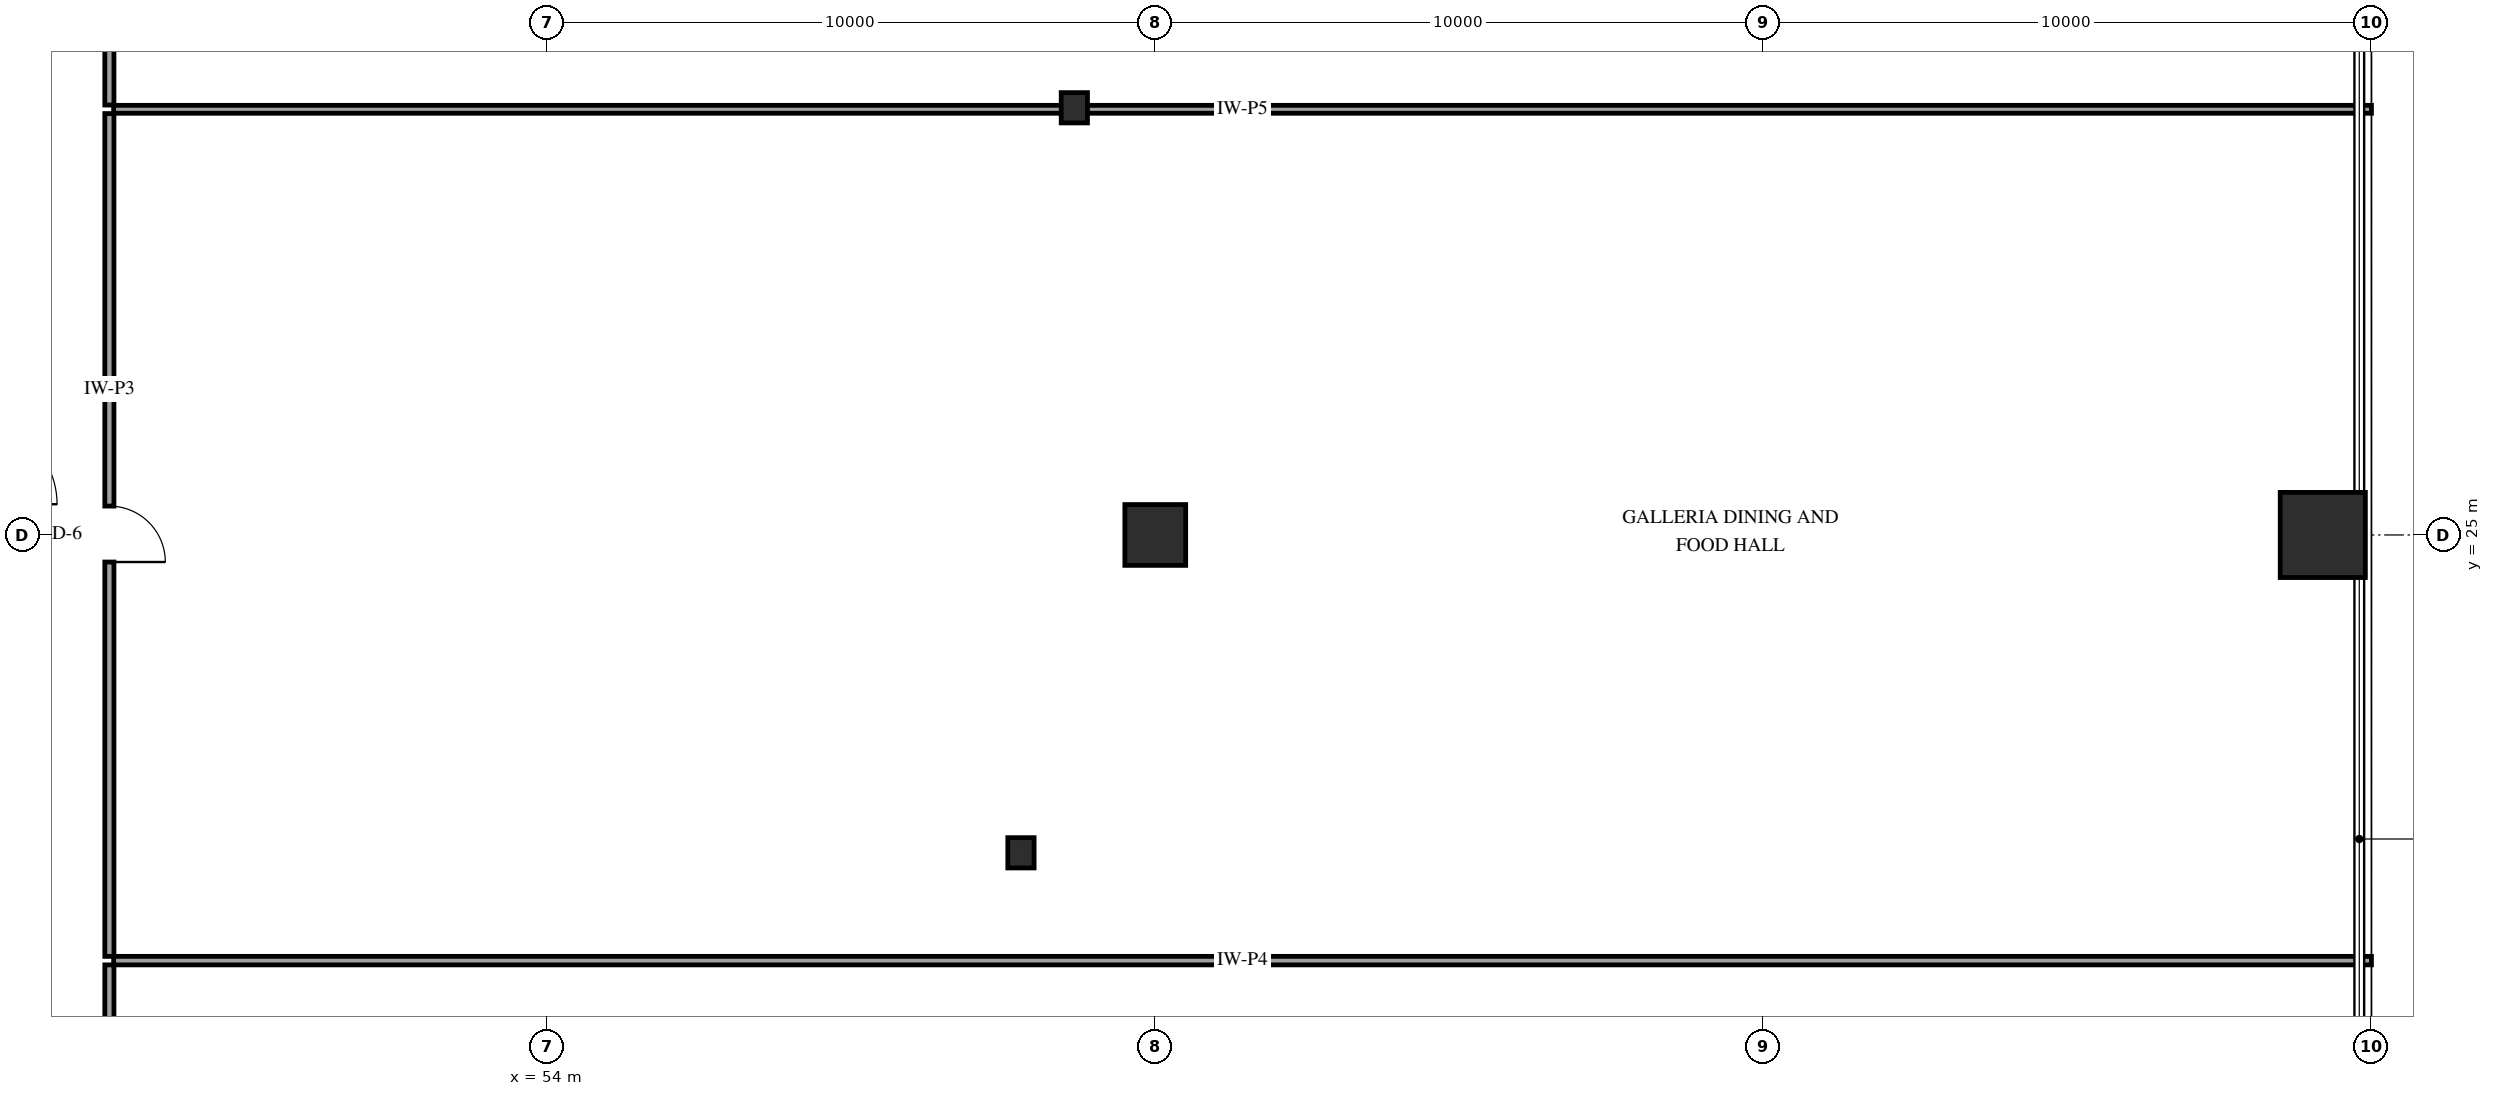
"""IFC4 building model, lengths in metres.
Left out: names, types, materials, properties, quantities, classifications, styles, units other than length and angle.
Written with IfcOpenShell. Run it as: python <this file> out.ifc"""

import sys

from ifc_helpers import new_model, si_unit, direction, frame, frame_2d, origin, origin_2d, place, context, subcontext, project, spatial, rectangle, i_section, extrude, element, fill, save


model = new_model("IFC4")
c1 = context("Model", 3, precision=1e-05, world=origin(), true_north=direction((0.0, 1.0)))
c2 = subcontext(c1, "Body", "Model", "MODEL_VIEW")
j1 = project(units=[si_unit("LENGTHUNIT", "METRE"), si_unit("PLANEANGLEUNIT", "RADIAN")], contexts=[c1])
p1 = place(None, origin())
s1 = spatial("IfcSite", under=j1, at=p1, CompositionType="ELEMENT")
p2 = place(p1, origin())
s2 = spatial("IfcBuilding", under=s1, at=p2, CompositionType="ELEMENT")
p3 = place(p2, frame((0.0, 0.0, 11.4)))
s3 = spatial("IfcBuildingStorey", under=s2, at=p3, CompositionType="ELEMENT", Elevation=11.4)
p4 = place(p3, frame((64.0, 25.0, 0.0), z_axis=(0.0, 0.0, 1.0), x_axis=(1.0, 0.0, 0.0)))
e1 = element("IfcColumn", 1, at=p4, inside=s3, PredefinedType="COLUMN", context=c2, shape_type="SweptSolid", body=[
    extrude(rectangle(XDim=1.0, YDim=1.0, at=origin_2d()), origin(), (0.0, 0.0, 1.0), 4.8),
])
p5 = place(p3, frame((83.2, 25.0, 0.0), z_axis=(0.0, 0.0, 1.0), x_axis=(1.0, 0.0, 0.0)))
e2 = element("IfcColumn", 2, at=p5, inside=s3, PredefinedType="COLUMN", context=c2, shape_type="SweptSolid", body=[
    extrude(rectangle(XDim=1.4, YDim=1.4, at=origin_2d()), origin(), (0.0, 0.0, 1.0), 4.8),
])
for number, where, z_axis, x_axis in (
    (3, (62.669, 32.025, 0.0), (0.0, 0.0, 1.0), (1.0, 0.0, 0.0)),
    (4, (61.791, 19.773, 0.0), (0.0, 0.0, 1.0), (1.0, 0.0, 0.0)),
):
    element("IfcColumn", number, at=place(p3, frame(where, z_axis=z_axis, x_axis=x_axis)), inside=s3, PredefinedType="COLUMN", context=c2, shape_type="SweptSolid", body=[
        extrude(i_section(OverallWidth=0.432, OverallDepth=0.498, WebThickness=0.056, FlangeThickness=0.089, FilletRadius=0.038, at=origin_2d()), origin(), (0.0, 0.0, 1.0), 4.8),
    ])
p6 = place(p3, frame((46.87, 18.0, 0.0), z_axis=(0.0, 0.0, 1.0), x_axis=(1.0, 0.0, 0.0)))
e5 = element("IfcWall", 5, at=p6, inside=s3, PredefinedType="PARTITIONING", context=c2, shape_type="SweptSolid", body=[
    extrude(rectangle(XDim=37.13, YDim=0.14, at=frame_2d((18.565, 0.0))), origin(), (0.0, 0.0, 1.0), 4.48),
])
p7 = place(p3, frame((46.87, 32.0, 0.0), z_axis=(0.0, 0.0, 1.0), x_axis=(1.0, 0.0, 0.0)))
e6 = element("IfcWall", 6, at=p7, inside=s3, PredefinedType="PARTITIONING", context=c2, shape_type="SweptSolid", body=[
    extrude(rectangle(XDim=37.13, YDim=0.13, at=frame_2d((18.565, 0.0))), origin(), (0.0, 0.0, 1.0), 4.48),
])
p8 = place(p3, frame((46.8, 31.93, 0.0), z_axis=(0.0, 0.0, 1.0), x_axis=(0.0, -1.0, 0.0)))
e7 = element("IfcWall", 7, at=p8, inside=s3, PredefinedType="PARTITIONING", context=c2, shape_type="SweptSolid", body=[
    extrude(rectangle(XDim=13.86, YDim=0.15, at=frame_2d((6.93, 0.0))), origin(), (0.0, 0.0, 1.0), 4.48),
])
p9 = place(p8, frame((6.455, 0.0, 0.0)))
e8 = element("IfcOpeningElement", 8, at=p9, cuts=e7, PredefinedType="OPENING", context=c2, shape_type="SweptSolid", body=[
    extrude(rectangle(XDim=0.92, YDim=2.12, at=frame_2d((0.46, 1.06))), frame((0.0, 0.085, 0.0), z_axis=(0.0, -1.0, 0.0), x_axis=(1.0, 0.0, 0.0)), (0.0, 0.0, 1.0), 0.17),
])
p10 = place(p3, frame((46.8, 42.93, 0.0), z_axis=(0.0, 0.0, 1.0), x_axis=(0.0, -1.0, 0.0)))
e9 = element("IfcWall", 9, at=p10, inside=s3, PredefinedType="PARTITIONING", context=c2, shape_type="SweptSolid", body=[
    extrude(rectangle(XDim=10.86, YDim=0.15, at=frame_2d((5.43, 0.0))), origin(), (0.0, 0.0, 1.0), 4.48),
])
p11 = place(p3, frame((46.8, 17.93, 0.0), z_axis=(0.0, 0.0, 1.0), x_axis=(0.0, -1.0, 0.0)))
e10 = element("IfcWall", 10, at=p11, inside=s3, PredefinedType="PARTITIONING", context=c2, shape_type="SweptSolid", body=[
    extrude(rectangle(XDim=6.06, YDim=0.15, at=frame_2d((3.03, 0.0))), origin(), (0.0, 0.0, 1.0), 4.48),
])
p12 = place(p9, origin())
e11 = element("IfcDoor", 11, at=p12, inside=s3, OperationType="SINGLE_SWING_RIGHT", PredefinedType="DOOR", context=c2, shape_type="SweptSolid", body=[
    extrude(rectangle(XDim=0.92, YDim=2.12, at=frame_2d((0.46, 1.06))), frame((0.0, 0.025, 0.0), z_axis=(0.0, -1.0, 0.0), x_axis=(1.0, 0.0, 0.0)), (0.0, 0.0, 1.0), 0.05),
])
fill(e8, e11)
save(model, sys.argv[1])
